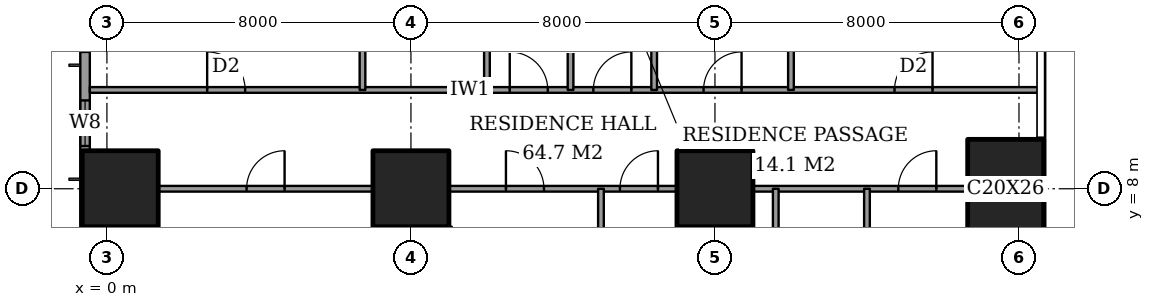
"""IFC4 building model, lengths in metres.
Left out: names, types, materials, properties, quantities, classifications, styles, units other than length and angle.
Written with IfcOpenShell. Run it as: python <this file> out.ifc"""

import sys

from ifc_helpers import new_model, si_unit, direction, frame, frame_2d, origin, origin_2d, place, context, subcontext, project, spatial, rectangle, extrude, element, fill, save


model = new_model("IFC4")
c1 = context("Model", 3, precision=1e-05, world=origin(), true_north=direction((0.0, 1.0)))
c2 = subcontext(c1, "Body", "Model", "MODEL_VIEW")
j1 = project(units=[si_unit("LENGTHUNIT", "METRE"), si_unit("PLANEANGLEUNIT", "RADIAN")], contexts=[c1])
p1 = place(None, origin())
s1 = spatial("IfcSite", under=j1, at=p1, CompositionType="ELEMENT")
p2 = place(p1, origin())
s2 = spatial("IfcBuilding", under=s1, at=p2, CompositionType="ELEMENT")
p3 = place(p2, frame((0.0, 0.0, 40.4)))
s3 = spatial("IfcBuildingStorey", under=s2, at=p3, CompositionType="ELEMENT", Elevation=40.4)
for number, where, z_axis, x_axis in (
    (1, (0.35, 8.0, 0.0), (0.0, 0.0, 1.0), (1.0, 0.0, 0.0)),
    (2, (8.0, 8.0, 0.0), (0.0, 0.0, 1.0), (1.0, 0.0, 0.0)),
    (3, (16.0, 8.0, 0.0), (0.0, 0.0, 1.0), (1.0, 0.0, 0.0)),
):
    element("IfcColumn", number, at=place(p3, frame(where, z_axis=z_axis, x_axis=x_axis)), inside=s3, PredefinedType="COLUMN", context=c2, shape_type="SweptSolid", body=[
        extrude(rectangle(XDim=2.0, YDim=2.0, at=origin_2d()), origin(), (0.0, 0.0, 1.0), 3.6),
    ])
p4 = place(p3, frame((23.65, 8.0, 0.0), z_axis=(0.0, 0.0, 1.0), x_axis=(1.0, 0.0, 0.0)))
e4 = element("IfcColumn", 4, at=p4, inside=s3, PredefinedType="COLUMN", context=c2, shape_type="SweptSolid", body=[
    extrude(rectangle(XDim=2.0, YDim=2.6, at=origin_2d()), origin(), (0.0, 0.0, 1.0), 3.6),
])
p5 = place(p3, frame((-0.575, 44.825, 0.0), z_axis=(0.0, 0.0, 1.0), x_axis=(0.0, -1.0, 0.0)))
e5 = element("IfcWall", 5, at=p5, inside=s3, PredefinedType="SOLIDWALL", context=c2, shape_type="SweptSolid", body=[
    extrude(rectangle(XDim=41.65, YDim=0.25, at=frame_2d((20.825, 0.0))), origin(), (0.0, 0.0, 1.0), 3.6),
])
p6 = place(p5, frame((0.775, 0.0, 0.6)))
e6 = element("IfcOpeningElement", 6, at=p6, cuts=e5, PredefinedType="OPENING", context=c2, shape_type="SweptSolid", body=[
    extrude(rectangle(XDim=2.4, YDim=2.0, at=frame_2d((1.2, 1.0))), frame((0.0, 0.135, 0.0), z_axis=(0.0, -1.0, 0.0), x_axis=(1.0, 0.0, 0.0)), (0.0, 0.0, 1.0), 0.27),
])
p7 = place(p5, frame((6.1, 0.0, 0.6)))
e7 = element("IfcOpeningElement", 7, at=p7, cuts=e5, PredefinedType="OPENING", context=c2, shape_type="SweptSolid", body=[
    extrude(rectangle(XDim=1.2, YDim=2.0, at=frame_2d((0.6, 1.0))), frame((0.0, 0.135, 0.0), z_axis=(0.0, -1.0, 0.0), x_axis=(1.0, 0.0, 0.0)), (0.0, 0.0, 1.0), 0.27),
])
p8 = place(p5, frame((8.425, 0.0, 0.6)))
e8 = element("IfcOpeningElement", 8, at=p8, cuts=e5, PredefinedType="OPENING", context=c2, shape_type="SweptSolid", body=[
    extrude(rectangle(XDim=2.4, YDim=2.0, at=frame_2d((1.2, 1.0))), frame((0.0, 0.135, 0.0), z_axis=(0.0, -1.0, 0.0), x_axis=(1.0, 0.0, 0.0)), (0.0, 0.0, 1.0), 0.27),
])
p9 = place(p5, frame((15.625, 0.0, 0.6)))
e9 = element("IfcOpeningElement", 9, at=p9, cuts=e5, PredefinedType="OPENING", context=c2, shape_type="SweptSolid", body=[
    extrude(rectangle(XDim=2.4, YDim=2.0, at=frame_2d((1.2, 1.0))), frame((0.0, 0.135, 0.0), z_axis=(0.0, -1.0, 0.0), x_axis=(1.0, 0.0, 0.0)), (0.0, 0.0, 1.0), 0.27),
])
p10 = place(p5, frame((23.625, 0.0, 0.6)))
e10 = element("IfcOpeningElement", 10, at=p10, cuts=e5, PredefinedType="OPENING", context=c2, shape_type="SweptSolid", body=[
    extrude(rectangle(XDim=2.4, YDim=2.0, at=frame_2d((1.2, 1.0))), frame((0.0, 0.135, 0.0), z_axis=(0.0, -1.0, 0.0), x_axis=(1.0, 0.0, 0.0)), (0.0, 0.0, 1.0), 0.27),
])
p11 = place(p5, frame((30.825, 0.0, 0.6)))
e11 = element("IfcOpeningElement", 11, at=p11, cuts=e5, PredefinedType="OPENING", context=c2, shape_type="SweptSolid", body=[
    extrude(rectangle(XDim=2.4, YDim=2.0, at=frame_2d((1.2, 1.0))), frame((0.0, 0.135, 0.0), z_axis=(0.0, -1.0, 0.0), x_axis=(1.0, 0.0, 0.0)), (0.0, 0.0, 1.0), 0.27),
])
p12 = place(p5, frame((34.5, 0.0, 0.6)))
e12 = element("IfcOpeningElement", 12, at=p12, cuts=e5, PredefinedType="OPENING", context=c2, shape_type="SweptSolid", body=[
    extrude(rectangle(XDim=1.2, YDim=2.0, at=frame_2d((0.6, 1.0))), frame((0.0, 0.135, 0.0), z_axis=(0.0, -1.0, 0.0), x_axis=(1.0, 0.0, 0.0)), (0.0, 0.0, 1.0), 0.27),
])
p13 = place(p5, frame((38.475, 0.0, 0.6)))
e13 = element("IfcOpeningElement", 13, at=p13, cuts=e5, PredefinedType="OPENING", context=c2, shape_type="SweptSolid", body=[
    extrude(rectangle(XDim=2.4, YDim=2.0, at=frame_2d((1.2, 1.0))), frame((0.0, 0.135, 0.0), z_axis=(0.0, -1.0, 0.0), x_axis=(1.0, 0.0, 0.0)), (0.0, 0.0, 1.0), 0.27),
])
p14 = place(p3, frame((1.35, 8.0, 0.0), z_axis=(0.0, 0.0, 1.0), x_axis=(1.0, 0.0, 0.0)))
e14 = element("IfcWall", 14, at=p14, inside=s3, PredefinedType="PARTITIONING", context=c2, shape_type="SweptSolid", body=[
    extrude(rectangle(XDim=5.65, YDim=0.15, at=frame_2d((2.825, 0.0))), origin(), (0.0, 0.0, 1.0), 3.35),
])
p15 = place(p14, frame((2.325, 0.0, 0.0)))
e15 = element("IfcOpeningElement", 15, at=p15, cuts=e14, PredefinedType="OPENING", context=c2, shape_type="SweptSolid", body=[
    extrude(rectangle(XDim=1.0, YDim=2.1, at=frame_2d((0.5, 1.05))), frame((0.0, 0.085, 0.0), z_axis=(0.0, -1.0, 0.0), x_axis=(1.0, 0.0, 0.0)), (0.0, 0.0, 1.0), 0.17),
])
p16 = place(p3, frame((9.0, 8.0, 0.0), z_axis=(0.0, 0.0, 1.0), x_axis=(1.0, 0.0, 0.0)))
e16 = element("IfcWall", 16, at=p16, inside=s3, PredefinedType="PARTITIONING", context=c2, shape_type="SweptSolid", body=[
    extrude(rectangle(XDim=6.0, YDim=0.15, at=frame_2d((3.0, 0.0))), origin(), (0.0, 0.0, 1.0), 3.35),
])
p17 = place(p16, frame((1.5, 0.0, 0.0)))
e17 = element("IfcOpeningElement", 17, at=p17, cuts=e16, PredefinedType="OPENING", context=c2, shape_type="SweptSolid", body=[
    extrude(rectangle(XDim=1.0, YDim=2.1, at=frame_2d((0.5, 1.05))), frame((0.0, 0.085, 0.0), z_axis=(0.0, -1.0, 0.0), x_axis=(1.0, 0.0, 0.0)), (0.0, 0.0, 1.0), 0.17),
])
p18 = place(p16, frame((4.5, 0.0, 0.0)))
e18 = element("IfcOpeningElement", 18, at=p18, cuts=e16, PredefinedType="OPENING", context=c2, shape_type="SweptSolid", body=[
    extrude(rectangle(XDim=1.0, YDim=2.1, at=frame_2d((0.5, 1.05))), frame((0.0, 0.085, 0.0), z_axis=(0.0, -1.0, 0.0), x_axis=(1.0, 0.0, 0.0)), (0.0, 0.0, 1.0), 0.17),
])
p19 = place(p3, frame((17.0, 8.0, 0.0), z_axis=(0.0, 0.0, 1.0), x_axis=(1.0, 0.0, 0.0)))
e19 = element("IfcWall", 19, at=p19, inside=s3, PredefinedType="PARTITIONING", context=c2, shape_type="SweptSolid", body=[
    extrude(rectangle(XDim=5.65, YDim=0.15, at=frame_2d((2.825, 0.0))), origin(), (0.0, 0.0, 1.0), 3.35),
])
p20 = place(p19, frame((3.825, 0.0, 0.0)))
e20 = element("IfcOpeningElement", 20, at=p20, cuts=e19, PredefinedType="OPENING", context=c2, shape_type="SweptSolid", body=[
    extrude(rectangle(XDim=1.0, YDim=2.1, at=frame_2d((0.5, 1.05))), frame((0.0, 0.085, 0.0), z_axis=(0.0, -1.0, 0.0), x_axis=(1.0, 0.0, 0.0)), (0.0, 0.0, 1.0), 0.17),
])
p21 = place(p3, frame((-0.45, 10.6, 0.0), z_axis=(0.0, 0.0, 1.0), x_axis=(1.0, 0.0, 0.0)))
e21 = element("IfcWall", 21, at=p21, inside=s3, PredefinedType="PARTITIONING", context=c2, shape_type="SweptSolid", body=[
    extrude(rectangle(XDim=25.011, YDim=0.15, at=frame_2d((12.505, 0.0))), origin(), (0.0, 0.0, 1.0), 3.35),
])
p22 = place(p21, frame((13.25, 0.0, 0.0)))
e22 = element("IfcOpeningElement", 22, at=p22, cuts=e21, PredefinedType="OPENING", context=c2, shape_type="SweptSolid", body=[
    extrude(rectangle(XDim=1.0, YDim=2.1, at=frame_2d((0.5, 1.05))), frame((0.0, 0.085, 0.0), z_axis=(0.0, -1.0, 0.0), x_axis=(1.0, 0.0, 0.0)), (0.0, 0.0, 1.0), 0.17),
])
p23 = place(p21, frame((3.087, 0.0, 0.0)))
e23 = element("IfcOpeningElement", 23, at=p23, cuts=e21, PredefinedType="OPENING", context=c2, shape_type="SweptSolid", body=[
    extrude(rectangle(XDim=1.0, YDim=2.1, at=frame_2d((0.5, 1.05))), frame((0.0, 0.085, 0.0), z_axis=(0.0, -1.0, 0.0), x_axis=(1.0, 0.0, 0.0)), (0.0, 0.0, 1.0), 0.17),
])
p24 = place(p21, frame((11.05, 0.0, 0.0)))
e24 = element("IfcOpeningElement", 24, at=p24, cuts=e21, PredefinedType="OPENING", context=c2, shape_type="SweptSolid", body=[
    extrude(rectangle(XDim=1.0, YDim=2.1, at=frame_2d((0.5, 1.05))), frame((0.0, 0.085, 0.0), z_axis=(0.0, -1.0, 0.0), x_axis=(1.0, 0.0, 0.0)), (0.0, 0.0, 1.0), 0.17),
])
p25 = place(p21, frame((16.15, 0.0, 0.0)))
e25 = element("IfcOpeningElement", 25, at=p25, cuts=e21, PredefinedType="OPENING", context=c2, shape_type="SweptSolid", body=[
    extrude(rectangle(XDim=1.0, YDim=2.1, at=frame_2d((0.5, 1.05))), frame((0.0, 0.085, 0.0), z_axis=(0.0, -1.0, 0.0), x_axis=(1.0, 0.0, 0.0)), (0.0, 0.0, 1.0), 0.17),
])
p26 = place(p21, frame((21.175, 0.0, 0.0)))
e26 = element("IfcOpeningElement", 26, at=p26, cuts=e21, PredefinedType="OPENING", context=c2, shape_type="SweptSolid", body=[
    extrude(rectangle(XDim=1.0, YDim=2.1, at=frame_2d((0.5, 1.05))), frame((0.0, 0.085, 0.0), z_axis=(0.0, -1.0, 0.0), x_axis=(1.0, 0.0, 0.0)), (0.0, 0.0, 1.0), 0.17),
])
p27 = place(p3, frame((6.725, 10.6, 0.0), z_axis=(0.0, 0.0, 1.0), x_axis=(0.0, 1.0, 0.0)))
e27 = element("IfcWall", 27, at=p27, inside=s3, PredefinedType="PARTITIONING", context=c2, shape_type="SweptSolid", body=[
    extrude(rectangle(XDim=4.2, YDim=0.15, at=frame_2d((2.1, 0.0))), origin(), (0.0, 0.0, 1.0), 3.35),
])
p28 = place(p27, frame((1.2, 0.0, 0.0)))
e28 = element("IfcOpeningElement", 28, at=p28, cuts=e27, PredefinedType="OPENING", context=c2, shape_type="SweptSolid", body=[
    extrude(rectangle(XDim=0.9, YDim=2.1, at=frame_2d((0.45, 1.05))), frame((0.0, 0.085, 0.0), z_axis=(0.0, -1.0, 0.0), x_axis=(1.0, 0.0, 0.0)), (0.0, 0.0, 1.0), 0.17),
])
p29 = place(p3, frame((10.0, 10.6, 0.0), z_axis=(0.0, 0.0, 1.0), x_axis=(0.0, 1.0, 0.0)))
e29 = element("IfcWall", 29, at=p29, inside=s3, PredefinedType="PARTITIONING", context=c2, shape_type="SweptSolid", body=[
    extrude(rectangle(XDim=11.0, YDim=0.15, at=frame_2d((5.5, 0.0))), origin(), (0.0, 0.0, 1.0), 3.35),
])
p30 = place(p29, frame((8.2, 0.0, 0.0)))
e30 = element("IfcOpeningElement", 30, at=p30, cuts=e29, PredefinedType="OPENING", context=c2, shape_type="SweptSolid", body=[
    extrude(rectangle(XDim=1.0, YDim=2.1, at=frame_2d((0.5, 1.05))), frame((0.0, 0.085, 0.0), z_axis=(0.0, -1.0, 0.0), x_axis=(1.0, 0.0, 0.0)), (0.0, 0.0, 1.0), 0.17),
])
p31 = place(p3, frame((12.2, 10.6, 0.0), z_axis=(0.0, 0.0, 1.0), x_axis=(0.0, 1.0, 0.0)))
e31 = element("IfcWall", 31, at=p31, inside=s3, PredefinedType="PARTITIONING", context=c2, shape_type="SweptSolid", body=[
    extrude(rectangle(XDim=6.4, YDim=0.15, at=frame_2d((3.2, 0.0))), origin(), (0.0, 0.0, 1.0), 3.35),
])
p32 = place(p3, frame((13.0, -0.45, 0.0), z_axis=(0.0, 0.0, 1.0), x_axis=(0.0, 1.0, 0.0)))
e32 = element("IfcWall", 32, at=p32, inside=s3, PredefinedType="PARTITIONING", context=c2, shape_type="SweptSolid", body=[
    extrude(rectangle(XDim=8.45, YDim=0.15, at=frame_2d((4.225, 0.0))), origin(), (0.0, 0.0, 1.0), 3.35),
])
p33 = place(p3, frame((14.4, 10.6, 0.0), z_axis=(0.0, 0.0, 1.0), x_axis=(0.0, 1.0, 0.0)))
e33 = element("IfcWall", 33, at=p33, inside=s3, PredefinedType="PARTITIONING", context=c2, shape_type="SweptSolid", body=[
    extrude(rectangle(XDim=6.4, YDim=0.15, at=frame_2d((3.2, 0.0))), origin(), (0.0, 0.0, 1.0), 3.35),
])
p34 = place(p3, frame((17.6, -0.45, 0.0), z_axis=(0.0, 0.0, 1.0), x_axis=(0.0, 1.0, 0.0)))
e34 = element("IfcWall", 34, at=p34, inside=s3, PredefinedType="PARTITIONING", context=c2, shape_type="SweptSolid", body=[
    extrude(rectangle(XDim=8.45, YDim=0.15, at=frame_2d((4.225, 0.0))), origin(), (0.0, 0.0, 1.0), 3.35),
])
p35 = place(p3, frame((18.0, 10.6, 0.0), z_axis=(0.0, 0.0, 1.0), x_axis=(0.0, 1.0, 0.0)))
e35 = element("IfcWall", 35, at=p35, inside=s3, PredefinedType="PARTITIONING", context=c2, shape_type="SweptSolid", body=[
    extrude(rectangle(XDim=6.4, YDim=0.15, at=frame_2d((3.2, 0.0))), origin(), (0.0, 0.0, 1.0), 3.35),
])
p36 = place(p3, frame((20.0, -0.45, 0.0), z_axis=(0.0, 0.0, 1.0), x_axis=(0.0, 1.0, 0.0)))
e36 = element("IfcWall", 36, at=p36, inside=s3, PredefinedType="PARTITIONING", context=c2, shape_type="SweptSolid", body=[
    extrude(rectangle(XDim=8.45, YDim=0.15, at=frame_2d((4.225, 0.0))), origin(), (0.0, 0.0, 1.0), 3.35),
])
p37 = place(p36, frame((3.775, 0.0, 0.0)))
e37 = element("IfcOpeningElement", 37, at=p37, cuts=e36, PredefinedType="OPENING", context=c2, shape_type="SweptSolid", body=[
    extrude(rectangle(XDim=0.9, YDim=2.1, at=frame_2d((0.45, 1.05))), frame((0.0, 0.085, 0.0), z_axis=(0.0, -1.0, 0.0), x_axis=(1.0, 0.0, 0.0)), (0.0, 0.0, 1.0), 0.17),
])
p38 = place(p12, origin())
e38 = element("IfcWindow", 38, at=p38, inside=s3, PartitioningType="SINGLE_PANEL", PredefinedType="WINDOW", context=c2, shape_type="SweptSolid", body=[
    extrude(rectangle(XDim=1.2, YDim=2.0, at=frame_2d((0.6, 1.0))), frame((0.0, 0.03, 0.0), z_axis=(0.0, -1.0, 0.0), x_axis=(1.0, 0.0, 0.0)), (0.0, 0.0, 1.0), 0.06),
])
fill(e12, e38)
p39 = place(p15, origin())
e39 = element("IfcDoor", 39, at=p39, inside=s3, OperationType="SINGLE_SWING_LEFT", PredefinedType="DOOR", context=c2, shape_type="SweptSolid", body=[
    extrude(rectangle(XDim=1.0, YDim=2.1, at=frame_2d((0.5, 1.05))), frame((0.0, 0.025, 0.0), z_axis=(0.0, -1.0, 0.0), x_axis=(1.0, 0.0, 0.0)), (0.0, 0.0, 1.0), 0.05),
])
fill(e15, e39)
p40 = place(p17, origin())
e40 = element("IfcDoor", 40, at=p40, inside=s3, OperationType="SINGLE_SWING_RIGHT", PredefinedType="DOOR", context=c2, shape_type="SweptSolid", body=[
    extrude(rectangle(XDim=1.0, YDim=2.1, at=frame_2d((0.5, 1.05))), frame((0.0, 0.025, 0.0), z_axis=(0.0, -1.0, 0.0), x_axis=(1.0, 0.0, 0.0)), (0.0, 0.0, 1.0), 0.05),
])
fill(e17, e40)
p41 = place(p18, origin())
e41 = element("IfcDoor", 41, at=p41, inside=s3, OperationType="SINGLE_SWING_LEFT", PredefinedType="DOOR", context=c2, shape_type="SweptSolid", body=[
    extrude(rectangle(XDim=1.0, YDim=2.1, at=frame_2d((0.5, 1.05))), frame((0.0, 0.025, 0.0), z_axis=(0.0, -1.0, 0.0), x_axis=(1.0, 0.0, 0.0)), (0.0, 0.0, 1.0), 0.05),
])
fill(e18, e41)
p42 = place(p20, origin())
e42 = element("IfcDoor", 42, at=p42, inside=s3, OperationType="SINGLE_SWING_LEFT", PredefinedType="DOOR", context=c2, shape_type="SweptSolid", body=[
    extrude(rectangle(XDim=1.0, YDim=2.1, at=frame_2d((0.5, 1.05))), frame((0.0, 0.025, 0.0), z_axis=(0.0, -1.0, 0.0), x_axis=(1.0, 0.0, 0.0)), (0.0, 0.0, 1.0), 0.05),
])
fill(e20, e42)
p43 = place(p22, origin())
e43 = element("IfcDoor", 43, at=p43, inside=s3, OperationType="SINGLE_SWING_LEFT", PredefinedType="DOOR", context=c2, shape_type="SweptSolid", body=[
    extrude(rectangle(XDim=1.0, YDim=2.1, at=frame_2d((0.5, 1.05))), frame((0.0, 0.025, 0.0), z_axis=(0.0, -1.0, 0.0), x_axis=(1.0, 0.0, 0.0)), (0.0, 0.0, 1.0), 0.05),
])
fill(e22, e43)
p44 = place(p23, origin())
e44 = element("IfcDoor", 44, at=p44, inside=s3, OperationType="SINGLE_SWING_RIGHT", PredefinedType="DOOR", context=c2, shape_type="SweptSolid", body=[
    extrude(rectangle(XDim=1.0, YDim=2.1, at=frame_2d((0.5, 1.05))), frame((0.0, 0.025, 0.0), z_axis=(0.0, -1.0, 0.0), x_axis=(1.0, 0.0, 0.0)), (0.0, 0.0, 1.0), 0.05),
])
fill(e23, e44)
p45 = place(p24, origin())
e45 = element("IfcDoor", 45, at=p45, inside=s3, OperationType="SINGLE_SWING_RIGHT", PredefinedType="DOOR", context=c2, shape_type="SweptSolid", body=[
    extrude(rectangle(XDim=1.0, YDim=2.1, at=frame_2d((0.5, 1.05))), frame((0.0, 0.025, 0.0), z_axis=(0.0, -1.0, 0.0), x_axis=(1.0, 0.0, 0.0)), (0.0, 0.0, 1.0), 0.05),
])
fill(e24, e45)
p46 = place(p25, origin())
e46 = element("IfcDoor", 46, at=p46, inside=s3, OperationType="SINGLE_SWING_LEFT", PredefinedType="DOOR", context=c2, shape_type="SweptSolid", body=[
    extrude(rectangle(XDim=1.0, YDim=2.1, at=frame_2d((0.5, 1.05))), frame((0.0, 0.025, 0.0), z_axis=(0.0, -1.0, 0.0), x_axis=(1.0, 0.0, 0.0)), (0.0, 0.0, 1.0), 0.05),
])
fill(e25, e46)
p47 = place(p26, origin())
e47 = element("IfcDoor", 47, at=p47, inside=s3, OperationType="SINGLE_SWING_LEFT", PredefinedType="DOOR", context=c2, shape_type="SweptSolid", body=[
    extrude(rectangle(XDim=1.0, YDim=2.1, at=frame_2d((0.5, 1.05))), frame((0.0, 0.025, 0.0), z_axis=(0.0, -1.0, 0.0), x_axis=(1.0, 0.0, 0.0)), (0.0, 0.0, 1.0), 0.05),
])
fill(e26, e47)
save(model, sys.argv[1])
